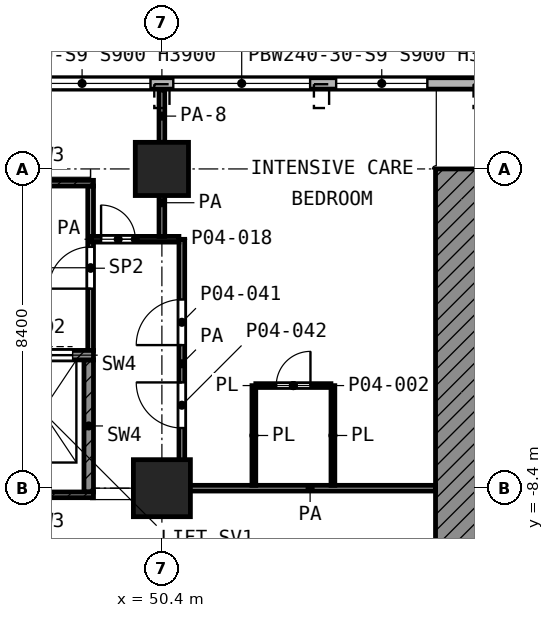
"""IFC4 building model, lengths in metres.
Left out: names, types, materials, properties, quantities, classifications, styles, units other than length and angle.
Written with IfcOpenShell. Run it as: python <this file> out.ifc"""

import sys

from ifc_helpers import new_model, si_unit, direction, frame, frame_2d, origin, origin_2d, place, context, subcontext, project, spatial, polyline, rectangle, outline, extrude, element, fill, save


model = new_model("IFC4")
c1 = context("Model", 3, precision=1e-05, world=origin(), true_north=direction((0.0, 1.0)))
c2 = subcontext(c1, "Body", "Model", "MODEL_VIEW")
j1 = project(units=[si_unit("LENGTHUNIT", "METRE"), si_unit("PLANEANGLEUNIT", "RADIAN")], contexts=[c1])
p1 = place(None, origin())
s1 = spatial("IfcSite", under=j1, at=p1, CompositionType="ELEMENT")
p2 = place(p1, origin())
s2 = spatial("IfcBuilding", under=s1, at=p2, CompositionType="ELEMENT")
p3 = place(p2, frame((0.0, 0.0, 18.2)))
s3 = spatial("IfcBuildingStorey", under=s2, at=p3, CompositionType="ELEMENT", Elevation=18.2)
p4 = place(p3, frame((50.4, 0.0, 0.0), z_axis=(0.0, 0.0, 1.0), x_axis=(1.0, 0.0, 0.0)))
e1 = element("IfcColumn", 1, at=p4, inside=s3, PredefinedType="COLUMN", context=c2, shape_type="SweptSolid", body=[
    extrude(rectangle(XDim=1.4, YDim=1.4, at=origin_2d()), origin(), (0.0, 0.0, 1.0), 5.6),
])
p5 = place(p3, frame((50.4, -8.4, 0.0), z_axis=(0.0, 0.0, 1.0), x_axis=(1.0, 0.0, 0.0)))
e2 = element("IfcColumn", 2, at=p5, inside=s3, PredefinedType="COLUMN", context=c2, shape_type="SweptSolid", body=[
    extrude(rectangle(XDim=1.5, YDim=1.5, at=origin_2d()), origin(), (0.0, 0.0, 1.0), 5.6),
])
p6 = place(p3, frame((0.0, 0.0, -18.2), z_axis=(0.0, -1.0, 0.0), x_axis=(1.0, 0.0, 0.0)))
e3 = element("IfcWall", 3, at=p6, inside=s3, PredefinedType="SHEAR", context=c2, shape_type="SweptSolid", body=[
    extrude(outline(polyline([(67.2, 23.25), (67.2, 22.4), (65.406, 21.022), (63.824, 19.406), (62.938, 18.2), (57.6, 18.2), (57.6, 23.25), (67.2, 23.25)])), origin(), (0.0, 0.0, 1.0), 33.6),
])
p7 = place(p3, frame((59.85, 2.25, 0.0), z_axis=(0.0, 0.0, 1.0), x_axis=(-1.0, 0.0, 0.0)))
e4 = element("IfcWall", 4, at=p7, inside=s3, PredefinedType="SOLIDWALL", context=c2, shape_type="SweptSolid", body=[
    extrude(rectangle(XDim=56.188, YDim=0.3, at=frame_2d((28.094, 0.0))), origin(), (0.0, 0.0, 1.0), 5.05),
])
p8 = place(p7, frame((2.465, 0.0, 0.9)))
e5 = element("IfcOpeningElement", 5, at=p8, cuts=e4, PredefinedType="OPENING", context=c2, shape_type="SweptSolid", body=[
    extrude(rectangle(XDim=2.4, YDim=3.0, at=frame_2d((1.2, 1.5))), frame((0.0, 0.16, 0.0), z_axis=(0.0, -1.0, 0.0), x_axis=(1.0, 0.0, 0.0)), (0.0, 0.0, 1.0), 0.32),
])
p9 = place(p7, frame((5.55, 0.0, 0.9)))
e6 = element("IfcOpeningElement", 6, at=p9, cuts=e4, PredefinedType="OPENING", context=c2, shape_type="SweptSolid", body=[
    extrude(rectangle(XDim=3.6, YDim=3.0, at=frame_2d((1.8, 1.5))), frame((0.0, 0.16, 0.0), z_axis=(0.0, -1.0, 0.0), x_axis=(1.0, 0.0, 0.0)), (0.0, 0.0, 1.0), 0.32),
])
p10 = place(p7, frame((9.75, 0.0, 0.9)))
e7 = element("IfcOpeningElement", 7, at=p10, cuts=e4, PredefinedType="OPENING", context=c2, shape_type="SweptSolid", body=[
    extrude(rectangle(XDim=3.6, YDim=3.0, at=frame_2d((1.8, 1.5))), frame((0.0, 0.16, 0.0), z_axis=(0.0, -1.0, 0.0), x_axis=(1.0, 0.0, 0.0)), (0.0, 0.0, 1.0), 0.32),
])
p11 = place(p7, frame((13.95, 0.0, 0.9)))
e8 = element("IfcOpeningElement", 8, at=p11, cuts=e4, PredefinedType="OPENING", context=c2, shape_type="SweptSolid", body=[
    extrude(rectangle(XDim=3.6, YDim=3.0, at=frame_2d((1.8, 1.5))), frame((0.0, 0.16, 0.0), z_axis=(0.0, -1.0, 0.0), x_axis=(1.0, 0.0, 0.0)), (0.0, 0.0, 1.0), 0.32),
])
p12 = place(p7, frame((19.965, 0.0, 0.9)))
e9 = element("IfcOpeningElement", 9, at=p12, cuts=e4, PredefinedType="OPENING", context=c2, shape_type="SweptSolid", body=[
    extrude(rectangle(XDim=1.2, YDim=3.0, at=frame_2d((0.6, 1.5))), frame((0.0, 0.16, 0.0), z_axis=(0.0, -1.0, 0.0), x_axis=(1.0, 0.0, 0.0)), (0.0, 0.0, 1.0), 0.32),
])
p13 = place(p7, frame((22.35, 0.0, 0.9)))
e10 = element("IfcOpeningElement", 10, at=p13, cuts=e4, PredefinedType="OPENING", context=c2, shape_type="SweptSolid", body=[
    extrude(rectangle(XDim=3.6, YDim=3.0, at=frame_2d((1.8, 1.5))), frame((0.0, 0.16, 0.0), z_axis=(0.0, -1.0, 0.0), x_axis=(1.0, 0.0, 0.0)), (0.0, 0.0, 1.0), 0.32),
])
p14 = place(p7, frame((26.55, 0.0, 0.9)))
e11 = element("IfcOpeningElement", 11, at=p14, cuts=e4, PredefinedType="OPENING", context=c2, shape_type="SweptSolid", body=[
    extrude(rectangle(XDim=3.6, YDim=3.0, at=frame_2d((1.8, 1.5))), frame((0.0, 0.16, 0.0), z_axis=(0.0, -1.0, 0.0), x_axis=(1.0, 0.0, 0.0)), (0.0, 0.0, 1.0), 0.32),
])
p15 = place(p7, frame((30.75, 0.0, 0.9)))
e12 = element("IfcOpeningElement", 12, at=p15, cuts=e4, PredefinedType="OPENING", context=c2, shape_type="SweptSolid", body=[
    extrude(rectangle(XDim=3.6, YDim=3.0, at=frame_2d((1.8, 1.5))), frame((0.0, 0.16, 0.0), z_axis=(0.0, -1.0, 0.0), x_axis=(1.0, 0.0, 0.0)), (0.0, 0.0, 1.0), 0.32),
])
p16 = place(p7, frame((34.95, 0.0, 0.9)))
e13 = element("IfcOpeningElement", 13, at=p16, cuts=e4, PredefinedType="OPENING", context=c2, shape_type="SweptSolid", body=[
    extrude(rectangle(XDim=3.6, YDim=3.0, at=frame_2d((1.8, 1.5))), frame((0.0, 0.16, 0.0), z_axis=(0.0, -1.0, 0.0), x_axis=(1.0, 0.0, 0.0)), (0.0, 0.0, 1.0), 0.32),
])
p17 = place(p7, frame((39.15, 0.0, 0.9)))
e14 = element("IfcOpeningElement", 14, at=p17, cuts=e4, PredefinedType="OPENING", context=c2, shape_type="SweptSolid", body=[
    extrude(rectangle(XDim=3.6, YDim=3.0, at=frame_2d((1.8, 1.5))), frame((0.0, 0.16, 0.0), z_axis=(0.0, -1.0, 0.0), x_axis=(1.0, 0.0, 0.0)), (0.0, 0.0, 1.0), 0.32),
])
p18 = place(p7, frame((43.35, 0.0, 0.9)))
e15 = element("IfcOpeningElement", 15, at=p18, cuts=e4, PredefinedType="OPENING", context=c2, shape_type="SweptSolid", body=[
    extrude(rectangle(XDim=3.6, YDim=3.0, at=frame_2d((1.8, 1.5))), frame((0.0, 0.16, 0.0), z_axis=(0.0, -1.0, 0.0), x_axis=(1.0, 0.0, 0.0)), (0.0, 0.0, 1.0), 0.32),
])
p19 = place(p7, frame((47.55, 0.0, 0.9)))
e16 = element("IfcOpeningElement", 16, at=p19, cuts=e4, PredefinedType="OPENING", context=c2, shape_type="SweptSolid", body=[
    extrude(rectangle(XDim=3.6, YDim=3.0, at=frame_2d((1.8, 1.5))), frame((0.0, 0.16, 0.0), z_axis=(0.0, -1.0, 0.0), x_axis=(1.0, 0.0, 0.0)), (0.0, 0.0, 1.0), 0.32),
])
p20 = place(p7, frame((51.75, 0.0, 0.9)))
e17 = element("IfcOpeningElement", 17, at=p20, cuts=e4, PredefinedType="OPENING", context=c2, shape_type="SweptSolid", body=[
    extrude(rectangle(XDim=3.6, YDim=3.0, at=frame_2d((1.8, 1.5))), frame((0.0, 0.16, 0.0), z_axis=(0.0, -1.0, 0.0), x_axis=(1.0, 0.0, 0.0)), (0.0, 0.0, 1.0), 0.32),
])
for number, where, z_axis, x_axis in (
    (18, (46.15, -0.375, 0.0), (0.0, 0.0, 1.0), (1.0, 0.0, 0.0)),
    (19, (46.15, -8.575, 0.0), (0.0, 0.0, 1.0), (1.0, 0.0, 0.0)),
):
    element("IfcWall", number, at=place(p3, frame(where, z_axis=z_axis, x_axis=x_axis)), inside=s3, PredefinedType="SHEAR", context=c2, shape_type="SweptSolid", body=[
        extrude(rectangle(XDim=2.45, YDim=0.15, at=frame_2d((1.225, 0.0))), origin(), (0.0, 0.0, 1.0), 5.05),
    ])
p21 = place(p3, frame((46.15, -4.9, 0.0), z_axis=(0.0, 0.0, 1.0), x_axis=(1.0, 0.0, 0.0)))
e20 = element("IfcWall", 20, at=p21, inside=s3, PredefinedType="SHEAR", context=c2, shape_type="SweptSolid", body=[
    extrude(rectangle(XDim=2.45, YDim=0.25, at=frame_2d((1.225, 0.0))), origin(), (0.0, 0.0, 1.0), 5.05),
])
p22 = place(p21, frame((0.6, 0.0, 0.0)))
e21 = element("IfcOpeningElement", 21, at=p22, cuts=e20, PredefinedType="OPENING", context=c2, shape_type="SweptSolid", body=[
    extrude(rectangle(XDim=1.3, YDim=2.1, at=frame_2d((0.65, 1.05))), frame((0.0, 0.135, 0.0), z_axis=(0.0, -1.0, 0.0), x_axis=(1.0, 0.0, 0.0)), (0.0, 0.0, 1.0), 0.27),
])
p23 = place(p3, frame((48.475, -8.5, 0.0), z_axis=(0.0, 0.0, 1.0), x_axis=(0.0, 1.0, 0.0)))
e22 = element("IfcWall", 22, at=p23, inside=s3, PredefinedType="SHEAR", context=c2, shape_type="SweptSolid", body=[
    extrude(rectangle(XDim=3.475, YDim=0.25, at=frame_2d((1.738, 0.0))), origin(), (0.0, 0.0, 1.0), 5.05),
])
p24 = place(p3, frame((48.525, -4.775, 0.0), z_axis=(0.0, 0.0, 1.0), x_axis=(0.0, 1.0, 0.0)))
e23 = element("IfcWall", 23, at=p24, inside=s3, PredefinedType="PARTITIONING", context=c2, shape_type="SweptSolid", body=[
    extrude(rectangle(XDim=4.325, YDim=0.15, at=frame_2d((2.163, 0.0))), origin(), (0.0, 0.0, 1.0), 5.05),
])
p25 = place(p24, frame((1.625, 0.0, 0.0)))
e24 = element("IfcOpeningElement", 24, at=p25, cuts=e23, PredefinedType="OPENING", context=c2, shape_type="SweptSolid", body=[
    extrude(rectangle(XDim=1.1, YDim=2.1, at=frame_2d((0.55, 1.05))), frame((0.0, 0.085, 0.0), z_axis=(0.0, -1.0, 0.0), x_axis=(1.0, 0.0, 0.0)), (0.0, 0.0, 1.0), 0.17),
])
p26 = place(p3, frame((52.871, -5.7, 0.0), z_axis=(0.0, 0.0, 1.0), x_axis=(1.0, 0.0, 0.0)))
e25 = element("IfcWall", 25, at=p26, inside=s3, PredefinedType="PARTITIONING", context=c2, shape_type="SweptSolid", body=[
    extrude(rectangle(XDim=1.977, YDim=0.1, at=frame_2d((0.988, 0.0))), origin(), (0.0, 0.0, 1.0), 5.05),
])
p27 = place(p26, frame((0.538, 0.0, 0.0)))
e26 = element("IfcOpeningElement", 26, at=p27, cuts=e25, PredefinedType="OPENING", context=c2, shape_type="SweptSolid", body=[
    extrude(rectangle(XDim=0.9, YDim=2.1, at=frame_2d((0.45, 1.05))), frame((0.0, 0.06, 0.0), z_axis=(0.0, -1.0, 0.0), x_axis=(1.0, 0.0, 0.0)), (0.0, 0.0, 1.0), 0.12),
])
for number, where, z_axis, x_axis in (
    (27, (52.82, -8.325, 0.0), (0.0, 0.0, 1.0), (0.0, 1.0, 0.0)),
    (28, (54.9, -8.325, 0.0), (0.0, 0.0, 1.0), (0.0, 1.0, 0.0)),
):
    element("IfcWall", number, at=place(p3, frame(where, z_axis=z_axis, x_axis=x_axis)), inside=s3, PredefinedType="PARTITIONING", context=c2, shape_type="SweptSolid", body=[
        extrude(rectangle(XDim=2.623, YDim=0.1, at=frame_2d((1.312, 0.0))), origin(), (0.0, 0.0, 1.0), 5.05),
    ])
p28 = place(p3, frame((51.0, -8.4, 0.0), z_axis=(0.0, 0.0, 1.0), x_axis=(1.0, 0.0, 0.0)))
e29 = element("IfcWall", 29, at=p28, inside=s3, PredefinedType="PARTITIONING", context=c2, shape_type="SweptSolid", body=[
    extrude(rectangle(XDim=6.6, YDim=0.15, at=frame_2d((3.3, 0.0))), origin(), (0.0, 0.0, 1.0), 5.05),
])
p29 = place(p3, frame((48.55, -1.85, 0.0), z_axis=(0.0, 0.0, 1.0), x_axis=(1.0, 0.0, 0.0)))
e30 = element("IfcWall", 30, at=p29, inside=s3, PredefinedType="PARTITIONING", context=c2, shape_type="SweptSolid", body=[
    extrude(rectangle(XDim=2.298, YDim=0.15, at=frame_2d((1.149, 0.0))), origin(), (0.0, 0.0, 1.0), 5.05),
])
p30 = place(p29, frame((0.25, 0.0, 0.0)))
e31 = element("IfcOpeningElement", 31, at=p30, cuts=e30, PredefinedType="OPENING", context=c2, shape_type="SweptSolid", body=[
    extrude(rectangle(XDim=0.9, YDim=2.1, at=frame_2d((0.45, 1.05))), frame((0.0, 0.085, 0.0), z_axis=(0.0, -1.0, 0.0), x_axis=(1.0, 0.0, 0.0)), (0.0, 0.0, 1.0), 0.17),
])
p31 = place(p3, frame((50.4, -1.775, 0.0), z_axis=(0.0, 0.0, 1.0), x_axis=(0.0, 1.0, 0.0)))
e32 = element("IfcWall", 32, at=p31, inside=s3, PredefinedType="PARTITIONING", context=c2, shape_type="SweptSolid", body=[
    extrude(rectangle(XDim=1.772, YDim=0.15, at=frame_2d((0.886, 0.0))), origin(), (0.0, 0.0, 1.0), 5.05),
])
p32 = place(p3, frame((50.4, 0.7, 0.0), z_axis=(0.0, 0.0, 1.0), x_axis=(0.0, 1.0, 0.0)))
e33 = element("IfcWall", 33, at=p32, inside=s3, PredefinedType="PARTITIONING", context=c2, shape_type="SweptSolid", body=[
    extrude(rectangle(XDim=1.38, YDim=0.15, at=frame_2d((0.69, 0.0))), origin(), (0.0, 0.0, 1.0), 4.15),
])
p33 = place(p3, frame((50.925, -8.4, 0.0), z_axis=(0.0, 0.0, 1.0), x_axis=(0.0, 1.0, 0.0)))
e34 = element("IfcWall", 34, at=p33, inside=s3, PredefinedType="PARTITIONING", context=c2, shape_type="SweptSolid", body=[
    extrude(rectangle(XDim=6.548, YDim=0.15, at=frame_2d((3.274, 0.0))), origin(), (0.0, 0.0, 1.0), 5.05),
])
p34 = place(p33, frame((3.765, 0.0, 0.0)))
e35 = element("IfcOpeningElement", 35, at=p34, cuts=e34, PredefinedType="OPENING", context=c2, shape_type="SweptSolid", body=[
    extrude(rectangle(XDim=1.2, YDim=2.1, at=frame_2d((0.6, 1.05))), frame((0.0, 0.085, 0.0), z_axis=(0.0, -1.0, 0.0), x_axis=(1.0, 0.0, 0.0)), (0.0, 0.0, 1.0), 0.17),
])
p35 = place(p33, frame((1.583, 0.0, 0.0)))
e36 = element("IfcOpeningElement", 36, at=p35, cuts=e34, PredefinedType="OPENING", context=c2, shape_type="SweptSolid", body=[
    extrude(rectangle(XDim=1.2, YDim=2.1, at=frame_2d((0.6, 1.05))), frame((0.0, 0.085, 0.0), z_axis=(0.0, -1.0, 0.0), x_axis=(1.0, 0.0, 0.0)), (0.0, 0.0, 1.0), 0.17),
])
p36 = place(p8, origin())
e37 = element("IfcWindow", 37, at=p36, inside=s3, PartitioningType="SINGLE_PANEL", PredefinedType="WINDOW", context=c2, shape_type="SweptSolid", body=[
    extrude(rectangle(XDim=2.4, YDim=3.0, at=frame_2d((1.2, 1.5))), frame((0.0, 0.03, 0.0), z_axis=(0.0, -1.0, 0.0), x_axis=(1.0, 0.0, 0.0)), (0.0, 0.0, 1.0), 0.06),
])
fill(e5, e37)
p37 = place(p9, origin())
e38 = element("IfcWindow", 38, at=p37, inside=s3, PartitioningType="SINGLE_PANEL", PredefinedType="WINDOW", context=c2, shape_type="SweptSolid", body=[
    extrude(rectangle(XDim=3.6, YDim=3.0, at=frame_2d((1.8, 1.5))), frame((0.0, 0.03, 0.0), z_axis=(0.0, -1.0, 0.0), x_axis=(1.0, 0.0, 0.0)), (0.0, 0.0, 1.0), 0.06),
])
fill(e6, e38)
p38 = place(p10, origin())
e39 = element("IfcWindow", 39, at=p38, inside=s3, PartitioningType="SINGLE_PANEL", PredefinedType="WINDOW", context=c2, shape_type="SweptSolid", body=[
    extrude(rectangle(XDim=3.6, YDim=3.0, at=frame_2d((1.8, 1.5))), frame((0.0, 0.03, 0.0), z_axis=(0.0, -1.0, 0.0), x_axis=(1.0, 0.0, 0.0)), (0.0, 0.0, 1.0), 0.06),
])
fill(e7, e39)
p39 = place(p22, origin())
e40 = element("IfcDoor", 40, at=p39, inside=s3, OperationType="DOUBLE_DOOR_SLIDING", PredefinedType="DOOR", context=c2, shape_type="SweptSolid", body=[
    extrude(rectangle(XDim=1.3, YDim=2.1, at=frame_2d((0.65, 1.05))), frame((0.0, 0.025, 0.0), z_axis=(0.0, -1.0, 0.0), x_axis=(1.0, 0.0, 0.0)), (0.0, 0.0, 1.0), 0.05),
])
fill(e21, e40)
p40 = place(p25, origin())
e41 = element("IfcDoor", 41, at=p40, inside=s3, OperationType="SINGLE_SWING_LEFT", PredefinedType="DOOR", context=c2, shape_type="SweptSolid", body=[
    extrude(rectangle(XDim=1.1, YDim=2.1, at=frame_2d((0.55, 1.05))), frame((0.0, 0.025, 0.0), z_axis=(0.0, -1.0, 0.0), x_axis=(1.0, 0.0, 0.0)), (0.0, 0.0, 1.0), 0.05),
])
fill(e24, e41)
p41 = place(p30, origin())
e42 = element("IfcDoor", 42, at=p41, inside=s3, OperationType="SINGLE_SWING_LEFT", PredefinedType="DOOR", context=c2, shape_type="SweptSolid", body=[
    extrude(rectangle(XDim=0.9, YDim=2.1, at=frame_2d((0.45, 1.05))), frame((0.0, 0.025, 0.0), z_axis=(0.0, -1.0, 0.0), x_axis=(1.0, 0.0, 0.0)), (0.0, 0.0, 1.0), 0.05),
])
fill(e31, e42)
p42 = place(p34, origin())
e43 = element("IfcDoor", 43, at=p42, inside=s3, OperationType="SINGLE_SWING_LEFT", PredefinedType="DOOR", context=c2, shape_type="SweptSolid", body=[
    extrude(rectangle(XDim=1.2, YDim=2.1, at=frame_2d((0.6, 1.05))), frame((0.0, 0.025, 0.0), z_axis=(0.0, -1.0, 0.0), x_axis=(1.0, 0.0, 0.0)), (0.0, 0.0, 1.0), 0.05),
])
fill(e35, e43)
p43 = place(p35, origin())
e44 = element("IfcDoor", 44, at=p43, inside=s3, OperationType="SINGLE_SWING_RIGHT", PredefinedType="DOOR", context=c2, shape_type="SweptSolid", body=[
    extrude(rectangle(XDim=1.2, YDim=2.1, at=frame_2d((0.6, 1.05))), frame((0.0, 0.025, 0.0), z_axis=(0.0, -1.0, 0.0), x_axis=(1.0, 0.0, 0.0)), (0.0, 0.0, 1.0), 0.05),
])
fill(e36, e44)
p44 = place(p27, origin())
e45 = element("IfcDoor", 45, at=p44, inside=s3, OperationType="SINGLE_SWING_RIGHT", PredefinedType="DOOR", context=c2, shape_type="SweptSolid", body=[
    extrude(rectangle(XDim=0.9, YDim=2.1, at=frame_2d((0.45, 1.05))), frame((0.0, 0.025, 0.0), z_axis=(0.0, -1.0, 0.0), x_axis=(1.0, 0.0, 0.0)), (0.0, 0.0, 1.0), 0.05),
])
fill(e26, e45)
save(model, sys.argv[1])
